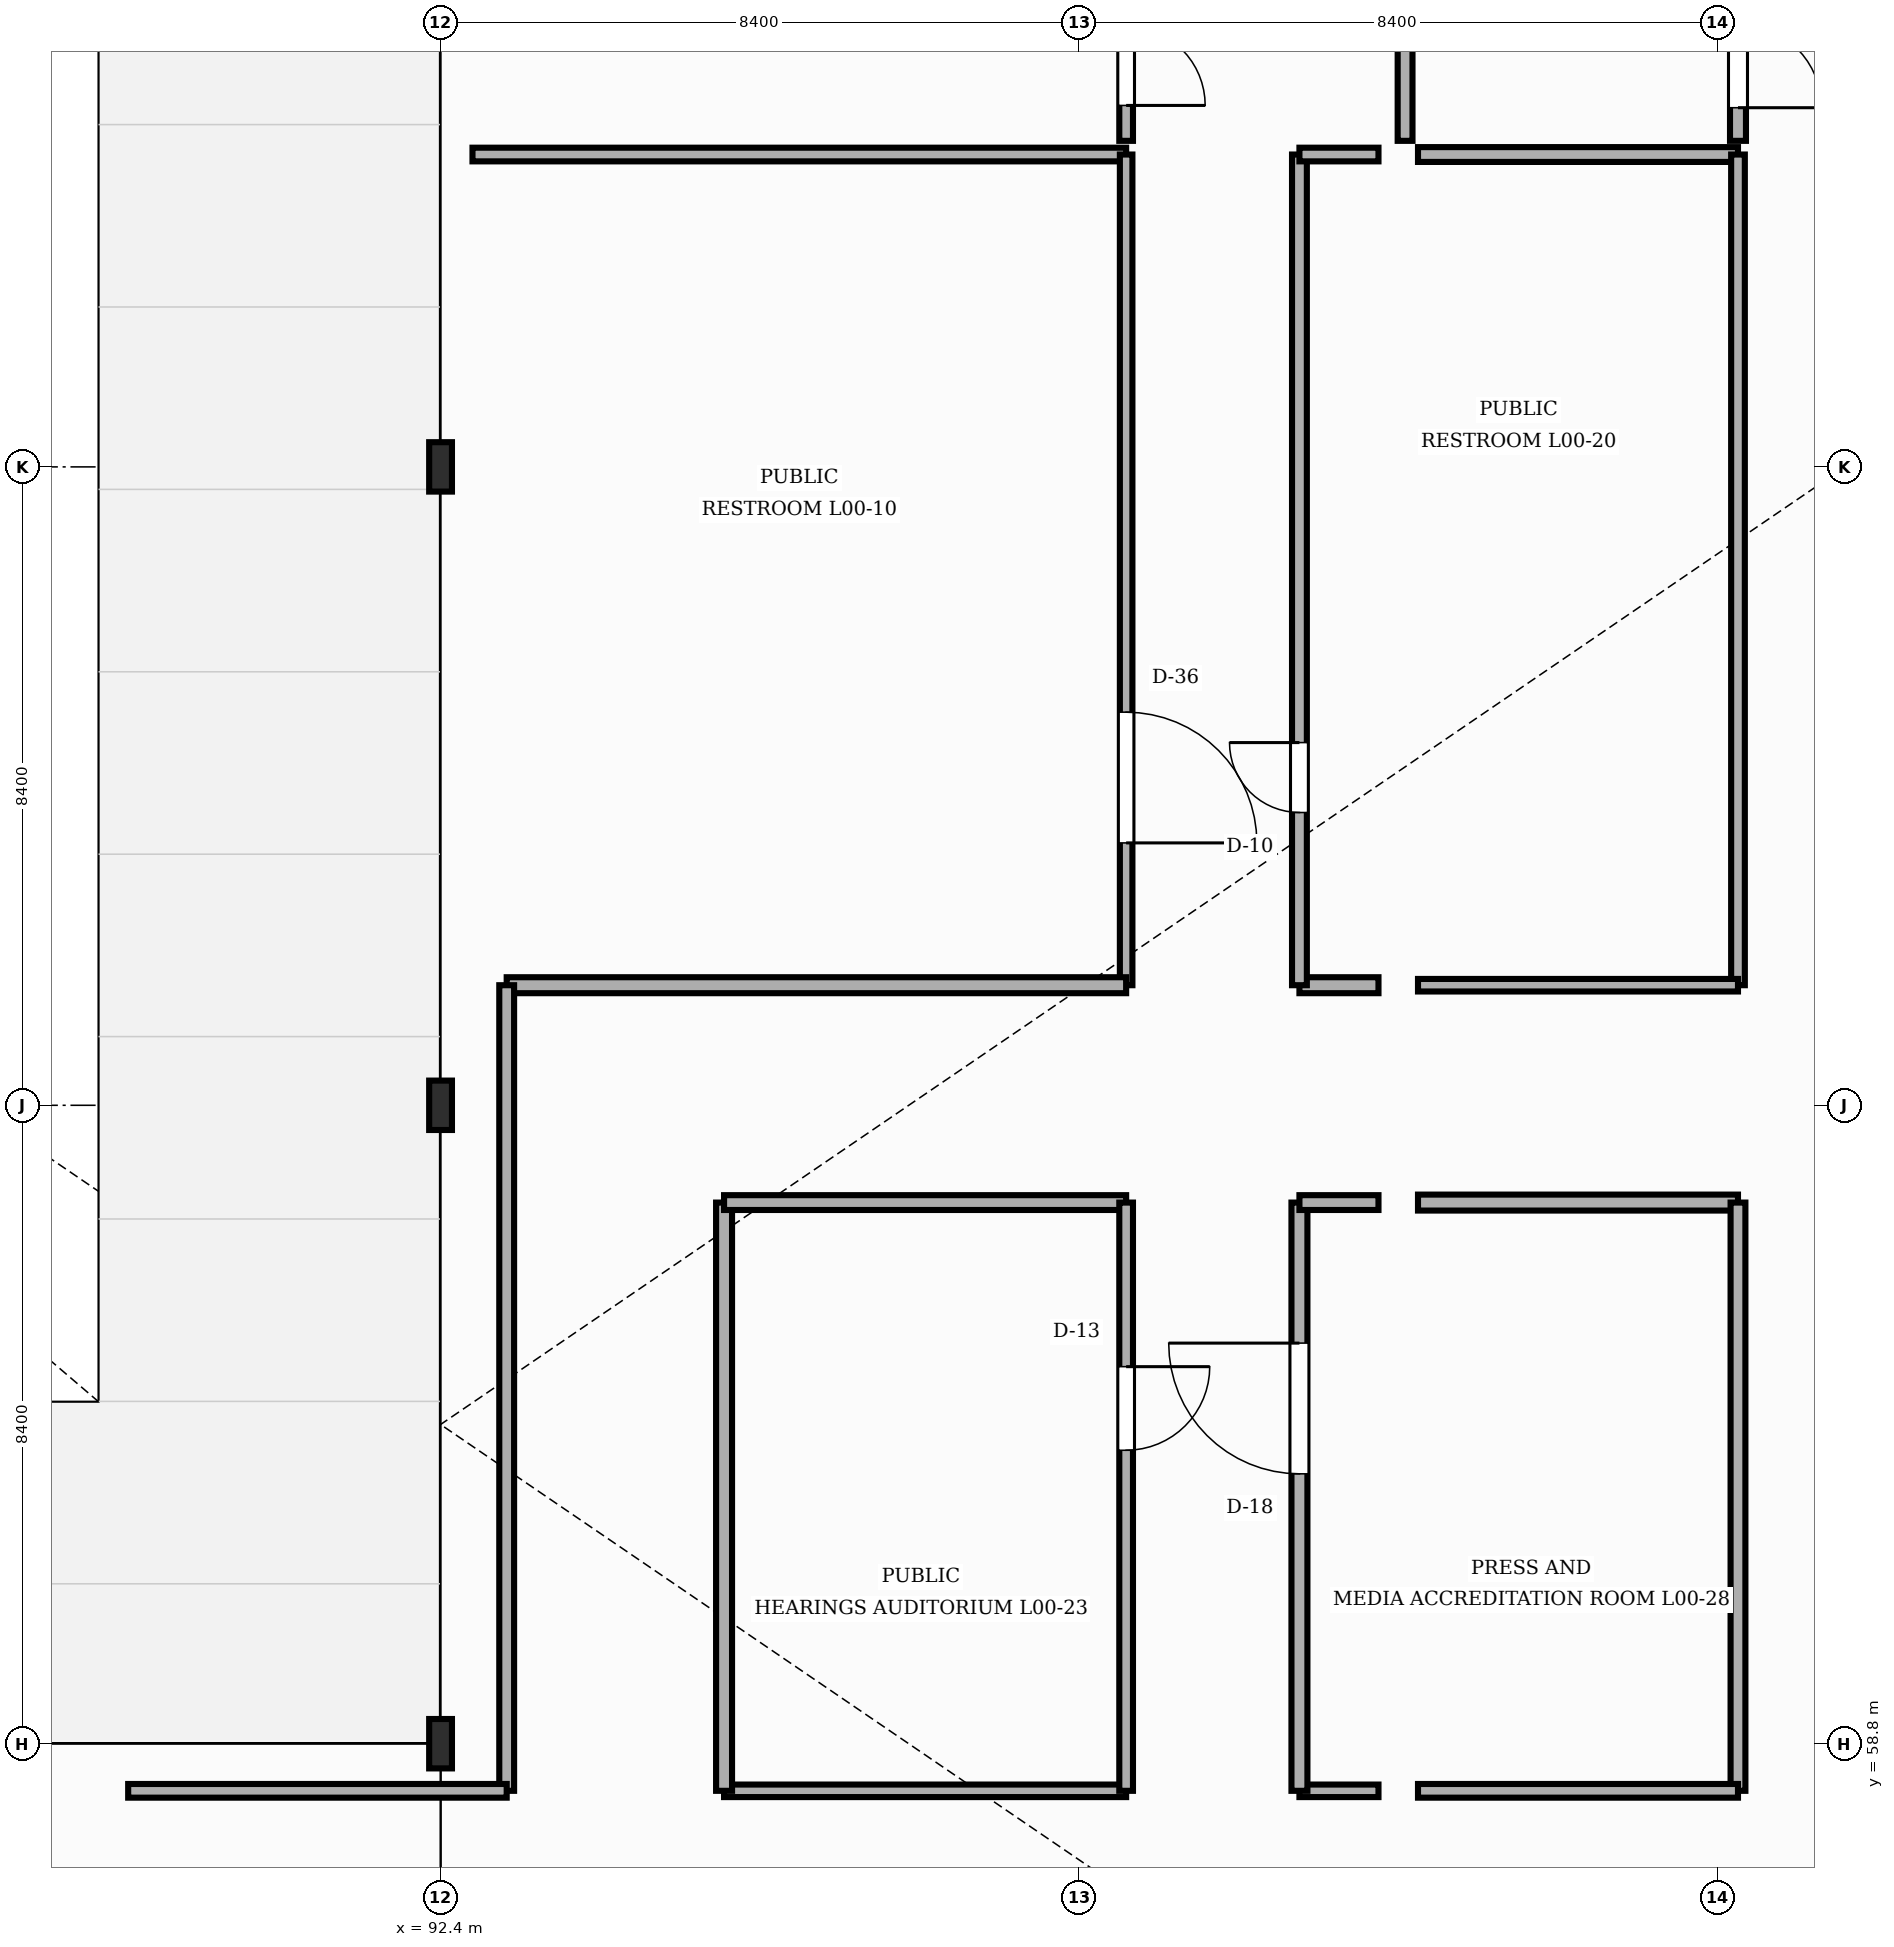
"""IFC4 building model, lengths in metres.
Left out: names, types, materials, properties, quantities, classifications, styles, units other than length and angle.
Written with IfcOpenShell. Run it as: python <this file> out.ifc"""

import sys

from ifc_helpers import new_model, si_unit, direction, frame, frame_2d, origin, origin_2d, place, context, subcontext, project, spatial, rectangle, i_section, extrude, element, fill, save


model = new_model("IFC4")
c1 = context("Model", 3, precision=1e-05, world=origin(), true_north=direction((0.0, 1.0)))
c2 = subcontext(c1, "Body", "Model", "MODEL_VIEW")
j1 = project(units=[si_unit("LENGTHUNIT", "METRE"), si_unit("PLANEANGLEUNIT", "RADIAN")], contexts=[c1])
p1 = place(None, origin())
s1 = spatial("IfcSite", under=j1, at=p1, CompositionType="ELEMENT")
p2 = place(p1, origin())
s2 = spatial("IfcBuilding", under=s1, at=p2, CompositionType="ELEMENT")
p3 = place(p2, origin())
s3 = spatial("IfcBuildingStorey", under=s2, at=p3, CompositionType="ELEMENT", Elevation=0.0)
for number, where, z_axis, x_axis in (
    (1, (92.4, 58.8, 0.0), (0.0, 0.0, 1.0), (1.0, 0.0, 0.0)),
    (2, (92.4, 67.2, 0.0), (0.0, 0.0, 1.0), (1.0, 0.0, 0.0)),
    (3, (92.4, 75.6, 0.0), (0.0, 0.0, 1.0), (1.0, 0.0, 0.0)),
):
    element("IfcColumn", number, at=place(p3, frame(where, z_axis=z_axis, x_axis=x_axis)), inside=s3, PredefinedType="COLUMN", context=c2, shape_type="SweptSolid", body=[
        extrude(i_section(OverallWidth=0.3, OverallDepth=0.65, WebThickness=0.016, FlangeThickness=0.031, FilletRadius=0.027, at=origin_2d()), origin(), (0.0, 0.0, 1.0), 5.4),
    ])
p4 = place(p3, frame((92.82, 79.71, -0.004), z_axis=(0.0, 0.0, 1.0), x_axis=(1.0, 0.0, 0.0)))
e4 = element("IfcWall", 4, at=p4, inside=s3, PredefinedType="STANDARD", context=c2, shape_type="SweptSolid", body=[
    extrude(rectangle(XDim=8.6, YDim=0.18, at=frame_2d((4.3, 0.0))), origin(), (0.0, 0.0, 1.0), 5.179),
])
p5 = place(p3, frame((101.42, 79.71, -0.004), z_axis=(0.0, 0.0, 1.0), x_axis=(0.0, -1.0, 0.0)))
e5 = element("IfcWall", 5, at=p5, inside=s3, PredefinedType="STANDARD", context=c2, shape_type="SweptSolid", body=[
    extrude(rectangle(XDim=10.93, YDim=0.165, at=frame_2d((5.465, 0.0))), origin(), (0.0, 0.0, 1.0), 5.179),
])
p6 = place(p5, frame((7.337, 0.0, 0.0)))
e6 = element("IfcOpeningElement", 6, at=p6, cuts=e5, PredefinedType="OPENING", context=c2, shape_type="SweptSolid", body=[
    extrude(rectangle(XDim=1.72, YDim=2.3, at=frame_2d((0.86, 1.15))), frame((0.0, 0.093, 0.0), z_axis=(0.0, -1.0, 0.0), x_axis=(1.0, 0.0, 0.0)), (0.0, 0.0, 1.0), 0.185),
])
p7 = place(p3, frame((101.42, 68.78, -0.004), z_axis=(0.0, 0.0, 1.0), x_axis=(-1.0, 0.0, 0.0)))
e7 = element("IfcWall", 7, at=p7, inside=s3, PredefinedType="STANDARD", context=c2, shape_type="SweptSolid", body=[
    extrude(rectangle(XDim=8.15, YDim=0.21, at=frame_2d((4.075, 0.0))), origin(), (0.0, 0.0, 1.0), 5.179),
])
p8 = place(p3, frame((93.27, 68.78, -0.004), z_axis=(0.0, 0.0, 1.0), x_axis=(0.0, -1.0, 0.0)))
e8 = element("IfcWall", 8, at=p8, inside=s3, PredefinedType="STANDARD", context=c2, shape_type="SweptSolid", body=[
    extrude(rectangle(XDim=10.6, YDim=0.195, at=frame_2d((5.3, 0.0))), origin(), (0.0, 0.0, 1.0), 5.179),
])
p9 = place(p3, frame((93.27, 58.18, -0.004), z_axis=(0.0, 0.0, 1.0), x_axis=(-1.0, 0.0, 0.0)))
e9 = element("IfcWall", 9, at=p9, inside=s3, PredefinedType="STANDARD", context=c2, shape_type="SweptSolid", body=[
    extrude(rectangle(XDim=4.98, YDim=0.18, at=frame_2d((2.49, 0.0))), origin(), (0.0, 0.0, 1.0), 5.179),
])
p10 = place(p3, frame((105.26, 79.71, -0.004), z_axis=(0.0, 0.0, 1.0), x_axis=(1.0, 0.0, 0.0)))
e10 = element("IfcWall", 10, at=p10, inside=s3, PredefinedType="STANDARD", context=c2, shape_type="SweptSolid", body=[
    extrude(rectangle(XDim=4.21, YDim=0.195, at=frame_2d((2.105, 0.0))), origin(), (0.0, 0.0, 1.0), 5.179),
])
p11 = place(p3, frame((109.47, 79.71, -0.004), z_axis=(0.0, 0.0, 1.0), x_axis=(0.0, -1.0, 0.0)))
e11 = element("IfcWall", 11, at=p11, inside=s3, PredefinedType="STANDARD", context=c2, shape_type="SweptSolid", body=[
    extrude(rectangle(XDim=10.93, YDim=0.18, at=frame_2d((5.465, 0.0))), origin(), (0.0, 0.0, 1.0), 5.179),
])
p12 = place(p3, frame((109.47, 68.78, -0.004), z_axis=(0.0, 0.0, 1.0), x_axis=(-1.0, 0.0, 0.0)))
e12 = element("IfcWall", 12, at=p12, inside=s3, PredefinedType="STANDARD", context=c2, shape_type="SweptSolid", body=[
    extrude(rectangle(XDim=4.21, YDim=0.165, at=frame_2d((2.105, 0.0))), origin(), (0.0, 0.0, 1.0), 5.179),
])
p13 = place(p3, frame((104.74, 68.78, -0.004), z_axis=(0.0, 0.0, 1.0), x_axis=(-1.0, 0.0, 0.0)))
e13 = element("IfcWall", 13, at=p13, inside=s3, PredefinedType="STANDARD", context=c2, shape_type="SweptSolid", body=[
    extrude(rectangle(XDim=1.04, YDim=0.21, at=frame_2d((0.52, 0.0))), origin(), (0.0, 0.0, 1.0), 5.179),
])
p14 = place(p3, frame((103.7, 68.78, -0.004), z_axis=(0.0, 0.0, 1.0), x_axis=(0.0, 1.0, 0.0)))
e14 = element("IfcWall", 14, at=p14, inside=s3, PredefinedType="STANDARD", context=c2, shape_type="SweptSolid", body=[
    extrude(rectangle(XDim=10.93, YDim=0.195, at=frame_2d((5.465, 0.0))), origin(), (0.0, 0.0, 1.0), 4.941),
])
p15 = place(p14, frame((2.272, 0.0, 0.0)))
e15 = element("IfcOpeningElement", 15, at=p15, cuts=e14, PredefinedType="OPENING", context=c2, shape_type="SweptSolid", body=[
    extrude(rectangle(XDim=0.92, YDim=2.14, at=frame_2d((0.46, 1.07))), frame((0.0, 0.107, 0.0), z_axis=(0.0, -1.0, 0.0), x_axis=(1.0, 0.0, 0.0)), (0.0, 0.0, 1.0), 0.215),
])
p16 = place(p3, frame((103.7, 79.71, -0.004), z_axis=(0.0, 0.0, 1.0), x_axis=(1.0, 0.0, 0.0)))
e16 = element("IfcWall", 16, at=p16, inside=s3, PredefinedType="STANDARD", context=c2, shape_type="SweptSolid", body=[
    extrude(rectangle(XDim=1.04, YDim=0.18, at=frame_2d((0.52, 0.0))), origin(), (0.0, 0.0, 1.0), 5.179),
])
p17 = place(p3, frame((101.42, 84.82, -0.004), z_axis=(0.0, 0.0, 1.0), x_axis=(0.0, -1.0, 0.0)))
e17 = element("IfcWall", 17, at=p17, inside=s3, PredefinedType="STANDARD", context=c2, shape_type="SweptSolid", body=[
    extrude(rectangle(XDim=4.93, YDim=0.18, at=frame_2d((2.465, 0.0))), origin(), (0.0, 0.0, 1.0), 5.179),
])
p18 = place(p17, frame((3.424, 0.0, 0.0)))
e18 = element("IfcOpeningElement", 18, at=p18, cuts=e17, PredefinedType="OPENING", context=c2, shape_type="SweptSolid", body=[
    extrude(rectangle(XDim=1.04, YDim=2.14, at=frame_2d((0.52, 1.07))), frame((0.0, 0.1, 0.0), z_axis=(0.0, -1.0, 0.0), x_axis=(1.0, 0.0, 0.0)), (0.0, 0.0, 1.0), 0.2),
])
p19 = place(p3, frame((101.42, 58.18, -0.004), z_axis=(0.0, 0.0, 1.0), x_axis=(-1.0, 0.0, 0.0)))
e19 = element("IfcWall", 19, at=p19, inside=s3, PredefinedType="STANDARD", context=c2, shape_type="SweptSolid", body=[
    extrude(rectangle(XDim=5.29, YDim=0.165, at=frame_2d((2.645, 0.0))), origin(), (0.0, 0.0, 1.0), 5.179),
])
p20 = place(p3, frame((96.13, 58.18, -0.004), z_axis=(0.0, 0.0, 1.0), x_axis=(0.0, 1.0, 0.0)))
e20 = element("IfcWall", 20, at=p20, inside=s3, PredefinedType="STANDARD", context=c2, shape_type="SweptSolid", body=[
    extrude(rectangle(XDim=7.74, YDim=0.21, at=frame_2d((3.87, 0.0))), origin(), (0.0, 0.0, 1.0), 5.179),
])
p21 = place(p3, frame((96.13, 65.92, -0.004), z_axis=(0.0, 0.0, 1.0), x_axis=(1.0, 0.0, 0.0)))
e21 = element("IfcWall", 21, at=p21, inside=s3, PredefinedType="STANDARD", context=c2, shape_type="SweptSolid", body=[
    extrude(rectangle(XDim=5.29, YDim=0.195, at=frame_2d((2.645, 0.0))), origin(), (0.0, 0.0, 1.0), 5.179),
])
p22 = place(p3, frame((101.42, 65.92, -0.004), z_axis=(0.0, 0.0, 1.0), x_axis=(0.0, -1.0, 0.0)))
e22 = element("IfcWall", 22, at=p22, inside=s3, PredefinedType="STANDARD", context=c2, shape_type="SweptSolid", body=[
    extrude(rectangle(XDim=7.74, YDim=0.18, at=frame_2d((3.87, 0.0))), origin(), (0.0, 0.0, 1.0), 5.179),
])
p23 = place(p22, frame((2.159, 0.0, 0.0)))
e23 = element("IfcOpeningElement", 23, at=p23, cuts=e22, PredefinedType="OPENING", context=c2, shape_type="SweptSolid", body=[
    extrude(rectangle(XDim=1.1, YDim=2.14, at=frame_2d((0.55, 1.07))), frame((0.0, 0.1, 0.0), z_axis=(0.0, -1.0, 0.0), x_axis=(1.0, 0.0, 0.0)), (0.0, 0.0, 1.0), 0.2),
])
p24 = place(p3, frame((105.26, 65.92, -0.004), z_axis=(0.0, 0.0, 1.0), x_axis=(1.0, 0.0, 0.0)))
e24 = element("IfcWall", 24, at=p24, inside=s3, PredefinedType="STANDARD", context=c2, shape_type="SweptSolid", body=[
    extrude(rectangle(XDim=4.21, YDim=0.21, at=frame_2d((2.105, 0.0))), origin(), (0.0, 0.0, 1.0), 5.179),
])
p25 = place(p3, frame((109.47, 65.92, -0.004), z_axis=(0.0, 0.0, 1.0), x_axis=(0.0, -1.0, 0.0)))
e25 = element("IfcWall", 25, at=p25, inside=s3, PredefinedType="STANDARD", context=c2, shape_type="SweptSolid", body=[
    extrude(rectangle(XDim=7.74, YDim=0.195, at=frame_2d((3.87, 0.0))), origin(), (0.0, 0.0, 1.0), 5.179),
])
p26 = place(p3, frame((109.47, 58.18, -0.004), z_axis=(0.0, 0.0, 1.0), x_axis=(-1.0, 0.0, 0.0)))
e26 = element("IfcWall", 26, at=p26, inside=s3, PredefinedType="STANDARD", context=c2, shape_type="SweptSolid", body=[
    extrude(rectangle(XDim=4.21, YDim=0.18, at=frame_2d((2.105, 0.0))), origin(), (0.0, 0.0, 1.0), 5.179),
])
p27 = place(p3, frame((104.74, 58.18, -0.004), z_axis=(0.0, 0.0, 1.0), x_axis=(-1.0, 0.0, 0.0)))
e27 = element("IfcWall", 27, at=p27, inside=s3, PredefinedType="STANDARD", context=c2, shape_type="SweptSolid", body=[
    extrude(rectangle(XDim=1.04, YDim=0.165, at=frame_2d((0.52, 0.0))), origin(), (0.0, 0.0, 1.0), 5.179),
])
p28 = place(p3, frame((103.7, 58.18, -0.004), z_axis=(0.0, 0.0, 1.0), x_axis=(0.0, 1.0, 0.0)))
e28 = element("IfcWall", 28, at=p28, inside=s3, PredefinedType="STANDARD", context=c2, shape_type="SweptSolid", body=[
    extrude(rectangle(XDim=7.74, YDim=0.21, at=frame_2d((3.87, 0.0))), origin(), (0.0, 0.0, 1.0), 5.179),
])
p29 = place(p28, frame((4.171, 0.0, 0.0)))
e29 = element("IfcOpeningElement", 29, at=p29, cuts=e28, PredefinedType="OPENING", context=c2, shape_type="SweptSolid", body=[
    extrude(rectangle(XDim=1.72, YDim=2.14, at=frame_2d((0.86, 1.07))), frame((0.0, 0.115, 0.0), z_axis=(0.0, -1.0, 0.0), x_axis=(1.0, 0.0, 0.0)), (0.0, 0.0, 1.0), 0.23),
])
p30 = place(p3, frame((103.7, 65.92, -0.004), z_axis=(0.0, 0.0, 1.0), x_axis=(1.0, 0.0, 0.0)))
e30 = element("IfcWall", 30, at=p30, inside=s3, PredefinedType="STANDARD", context=c2, shape_type="SweptSolid", body=[
    extrude(rectangle(XDim=1.04, YDim=0.195, at=frame_2d((0.52, 0.0))), origin(), (0.0, 0.0, 1.0), 5.179),
])
p31 = place(p3, frame((109.47, 84.82, -0.004), z_axis=(0.0, 0.0, 1.0), x_axis=(0.0, -1.0, 0.0)))
e31 = element("IfcWall", 31, at=p31, inside=s3, PredefinedType="STANDARD", context=c2, shape_type="SweptSolid", body=[
    extrude(rectangle(XDim=4.93, YDim=0.21, at=frame_2d((2.465, 0.0))), origin(), (0.0, 0.0, 1.0), 5.179),
])
p32 = place(p31, frame((3.394, 0.0, 0.0)))
e32 = element("IfcOpeningElement", 32, at=p32, cuts=e31, PredefinedType="OPENING", context=c2, shape_type="SweptSolid", body=[
    extrude(rectangle(XDim=1.1, YDim=2.22, at=frame_2d((0.55, 1.11))), frame((0.0, 0.115, 0.0), z_axis=(0.0, -1.0, 0.0), x_axis=(1.0, 0.0, 0.0)), (0.0, 0.0, 1.0), 0.23),
])
p33 = place(p3, frame((105.09, 79.89, -0.004), z_axis=(0.0, 0.0, 1.0), x_axis=(0.0, 1.0, 0.0)))
e33 = element("IfcWall", 33, at=p33, inside=s3, PredefinedType="STANDARD", context=c2, shape_type="SweptSolid", body=[
    extrude(rectangle(XDim=4.93, YDim=0.195, at=frame_2d((2.465, 0.0))), origin(), (0.0, 0.0, 1.0), 5.179),
])
p34 = place(p6, origin())
e34 = element("IfcDoor", 34, at=p34, inside=s3, OperationType="SINGLE_SWING_RIGHT", PredefinedType="DOOR", context=c2, shape_type="SweptSolid", body=[
    extrude(rectangle(XDim=1.72, YDim=2.3, at=frame_2d((0.86, 1.15))), frame((0.0, 0.025, 0.0), z_axis=(0.0, -1.0, 0.0), x_axis=(1.0, 0.0, 0.0)), (0.0, 0.0, 1.0), 0.05),
])
fill(e6, e34)
p35 = place(p15, origin())
e35 = element("IfcDoor", 35, at=p35, inside=s3, OperationType="SINGLE_SWING_RIGHT", PredefinedType="DOOR", context=c2, shape_type="SweptSolid", body=[
    extrude(rectangle(XDim=0.92, YDim=2.14, at=frame_2d((0.46, 1.07))), frame((0.0, 0.025, 0.0), z_axis=(0.0, -1.0, 0.0), x_axis=(1.0, 0.0, 0.0)), (0.0, 0.0, 1.0), 0.05),
])
fill(e15, e35)
p36 = place(p18, origin())
e36 = element("IfcDoor", 36, at=p36, inside=s3, OperationType="SINGLE_SWING_RIGHT", PredefinedType="DOOR", context=c2, shape_type="SweptSolid", body=[
    extrude(rectangle(XDim=1.04, YDim=2.14, at=frame_2d((0.52, 1.07))), frame((0.0, 0.025, 0.0), z_axis=(0.0, -1.0, 0.0), x_axis=(1.0, 0.0, 0.0)), (0.0, 0.0, 1.0), 0.05),
])
fill(e18, e36)
p37 = place(p23, origin())
e37 = element("IfcDoor", 37, at=p37, inside=s3, OperationType="SINGLE_SWING_LEFT", PredefinedType="DOOR", context=c2, shape_type="SweptSolid", body=[
    extrude(rectangle(XDim=1.1, YDim=2.14, at=frame_2d((0.55, 1.07))), frame((0.0, 0.025, 0.0), z_axis=(0.0, -1.0, 0.0), x_axis=(1.0, 0.0, 0.0)), (0.0, 0.0, 1.0), 0.05),
])
fill(e23, e37)
p38 = place(p29, origin())
e38 = element("IfcDoor", 38, at=p38, inside=s3, OperationType="SINGLE_SWING_RIGHT", PredefinedType="DOOR", context=c2, shape_type="SweptSolid", body=[
    extrude(rectangle(XDim=1.72, YDim=2.14, at=frame_2d((0.86, 1.07))), frame((0.0, 0.025, 0.0), z_axis=(0.0, -1.0, 0.0), x_axis=(1.0, 0.0, 0.0)), (0.0, 0.0, 1.0), 0.05),
])
fill(e29, e38)
p39 = place(p32, origin())
e39 = element("IfcDoor", 39, at=p39, inside=s3, OperationType="SINGLE_SWING_RIGHT", PredefinedType="DOOR", context=c2, shape_type="SweptSolid", body=[
    extrude(rectangle(XDim=1.1, YDim=2.22, at=frame_2d((0.55, 1.11))), frame((0.0, 0.025, 0.0), z_axis=(0.0, -1.0, 0.0), x_axis=(1.0, 0.0, 0.0)), (0.0, 0.0, 1.0), 0.05),
])
fill(e32, e39)
save(model, sys.argv[1])
